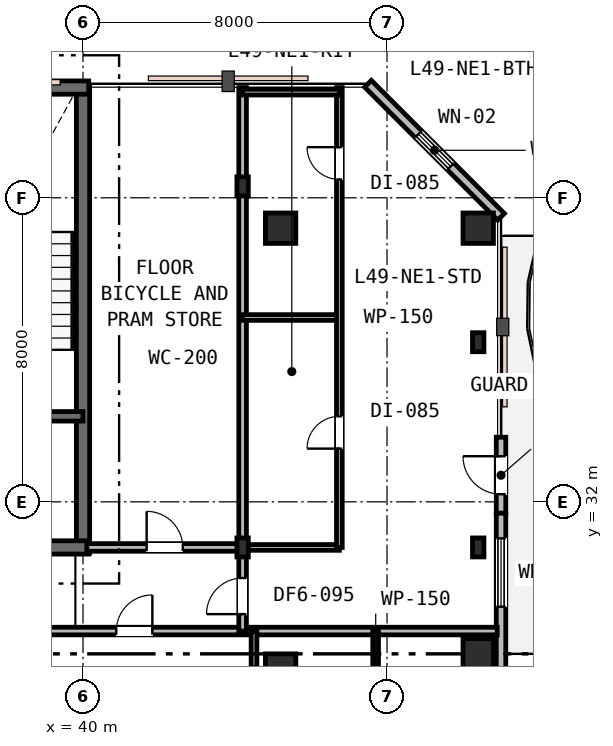
"""IFC4 building model, lengths in metres.
Left out: names, types, materials, properties, quantities, classifications, styles, units other than length and angle.
Written with IfcOpenShell. Run it as: python <this file> out.ifc"""

import sys

from ifc_helpers import new_model, si_unit, direction, frame, frame_2d, origin, origin_2d, place, context, subcontext, project, spatial, rectangle, i_section, extrude, element, fill, save


model = new_model("IFC4")
c1 = context("Model", 3, precision=1e-05, world=origin(), true_north=direction((0.0, 1.0)))
c2 = subcontext(c1, "Body", "Model", "MODEL_VIEW")
j1 = project(units=[si_unit("LENGTHUNIT", "METRE"), si_unit("PLANEANGLEUNIT", "RADIAN")], contexts=[c1])
p1 = place(None, origin())
s1 = spatial("IfcSite", under=j1, at=p1, CompositionType="ELEMENT")
p2 = place(p1, origin())
s2 = spatial("IfcBuilding", under=s1, at=p2, CompositionType="ELEMENT")
p3 = place(p2, frame((0.0, 0.0, 190.2)))
s3 = spatial("IfcBuildingStorey", under=s2, at=p3, CompositionType="ELEMENT", Elevation=190.2)
p4 = place(p3, frame((40.0, 30.65, 0.0), z_axis=(0.0, 0.0, 1.0), x_axis=(0.0, 1.0, 0.0)))
e1 = element("IfcWall", 1, at=p4, inside=s3, PredefinedType="SHEAR", context=c2, shape_type="SweptSolid", body=[
    extrude(rectangle(XDim=12.3, YDim=0.35, at=frame_2d((6.15, 0.0))), origin(), (0.0, 0.0, 1.0), 3.6),
])
p5 = place(p3, frame((15.85, 42.9, 0.0), z_axis=(0.0, 0.0, 1.0), x_axis=(1.0, 0.0, 0.0)))
e2 = element("IfcWall", 2, at=p5, inside=s3, PredefinedType="SHEAR", context=c2, shape_type="SweptSolid", body=[
    extrude(rectangle(XDim=24.3, YDim=0.35, at=frame_2d((12.15, 0.0))), origin(), (0.0, 0.0, 1.0), 3.6),
])
p6 = place(p5, frame((1.6, 0.0, 0.95)))
e3 = element("IfcOpeningElement", 3, at=p6, cuts=e2, PredefinedType="OPENING", context=c2, shape_type="SweptSolid", body=[
    extrude(rectangle(XDim=1.2, YDim=1.6, at=frame_2d((0.6, 0.8))), frame((0.0, 0.185, 0.0), z_axis=(0.0, -1.0, 0.0), x_axis=(1.0, 0.0, 0.0)), (0.0, 0.0, 1.0), 0.37),
])
p7 = place(p5, frame((16.5, 0.0, 0.95)))
e4 = element("IfcOpeningElement", 4, at=p7, cuts=e2, PredefinedType="OPENING", context=c2, shape_type="SweptSolid", body=[
    extrude(rectangle(XDim=1.2, YDim=1.6, at=frame_2d((0.6, 0.8))), frame((0.0, 0.185, 0.0), z_axis=(0.0, -1.0, 0.0), x_axis=(1.0, 0.0, 0.0)), (0.0, 0.0, 1.0), 0.37),
])
p8 = place(p5, frame((21.6, 0.0, 0.95)))
e5 = element("IfcOpeningElement", 5, at=p8, cuts=e2, PredefinedType="OPENING", context=c2, shape_type="SweptSolid", body=[
    extrude(rectangle(XDim=1.2, YDim=1.6, at=frame_2d((0.6, 0.8))), frame((0.0, 0.185, 0.0), z_axis=(0.0, -1.0, 0.0), x_axis=(1.0, 0.0, 0.0)), (0.0, 0.0, 1.0), 0.37),
])
p9 = place(p3, frame((28.95, 30.8, 0.0), z_axis=(0.0, 0.0, 1.0), x_axis=(1.0, 0.0, 0.0)))
e6 = element("IfcWall", 6, at=p9, inside=s3, PredefinedType="SHEAR", context=c2, shape_type="SweptSolid", body=[
    extrude(rectangle(XDim=11.2, YDim=0.35, at=frame_2d((5.6, 0.0))), origin(), (0.0, 0.0, 1.0), 3.6),
])
p10 = place(p9, frame((7.65, 0.0, 0.0)))
e7 = element("IfcOpeningElement", 7, at=p10, cuts=e6, PredefinedType="OPENING", context=c2, shape_type="SweptSolid", body=[
    extrude(rectangle(XDim=1.1, YDim=2.15, at=frame_2d((0.55, 1.075))), frame((0.0, 0.185, 0.0), z_axis=(0.0, -1.0, 0.0), x_axis=(1.0, 0.0, 0.0)), (0.0, 0.0, 1.0), 0.37),
])
p11 = place(p3, frame((33.95, 34.25, 0.0), z_axis=(0.0, 0.0, 1.0), x_axis=(1.0, 0.0, 0.0)))
e8 = element("IfcWall", 8, at=p11, inside=s3, PredefinedType="SHEAR", context=c2, shape_type="SweptSolid", body=[
    extrude(rectangle(XDim=6.05, YDim=0.25, at=frame_2d((3.025, 0.0))), origin(), (0.0, 0.0, 1.0), 3.6),
])
p12 = place(p11, frame((3.7, 0.0, 0.0)))
e9 = element("IfcOpeningElement", 9, at=p12, cuts=e8, PredefinedType="OPENING", context=c2, shape_type="SweptSolid", body=[
    extrude(rectangle(XDim=1.0, YDim=2.15, at=frame_2d((0.5, 1.075))), frame((0.0, 0.135, 0.0), z_axis=(0.0, -1.0, 0.0), x_axis=(1.0, 0.0, 0.0)), (0.0, 0.0, 1.0), 0.27),
])
p13 = place(p11, frame((0.55, 0.0, 0.0)))
e10 = element("IfcOpeningElement", 10, at=p13, cuts=e8, PredefinedType="OPENING", context=c2, shape_type="SweptSolid", body=[
    extrude(rectangle(XDim=1.1, YDim=2.15, at=frame_2d((0.55, 1.075))), frame((0.0, 0.135, 0.0), z_axis=(0.0, -1.0, 0.0), x_axis=(1.0, 0.0, 0.0)), (0.0, 0.0, 1.0), 0.27),
])
for number, where, z_axis, x_axis in (
    (11, (45.2, 27.6, 0.0), (0.0, 0.0, 1.0), (1.0, 0.0, 0.0)),
    (12, (45.2, 39.2, 0.0), (0.0, 0.0, 1.0), (1.0, 0.0, 0.0)),
    (13, (50.4, 28.0, 0.0), (0.0, 0.0, 1.0), (1.0, 0.0, 0.0)),
    (14, (50.4, 39.2, 0.0), (0.0, 0.0, 1.0), (1.0, 0.0, 0.0)),
):
    element("IfcColumn", number, at=place(p3, frame(where, z_axis=z_axis, x_axis=x_axis)), inside=s3, PredefinedType="COLUMN", context=c2, shape_type="SweptSolid", body=[
        extrude(rectangle(XDim=0.8, YDim=0.8, at=origin_2d()), origin(), (0.0, 0.0, 1.0), 3.6),
    ])
for number, where, z_axis, x_axis in (
    (15, (44.2, 30.8, 0.0), (0.0, 0.0, 1.0), (1.0, 0.0, 0.0)),
    (16, (44.2, 40.3, 0.0), (0.0, 0.0, 1.0), (1.0, 0.0, 0.0)),
    (17, (50.4, 30.8, 0.0), (0.0, 0.0, 1.0), (1.0, 0.0, 0.0)),
    (18, (50.4, 36.2, 0.0), (0.0, 0.0, 1.0), (1.0, 0.0, 0.0)),
):
    element("IfcColumn", number, at=place(p3, frame(where, z_axis=z_axis, x_axis=x_axis)), inside=s3, PredefinedType="COLUMN", context=c2, shape_type="SweptSolid", body=[
        extrude(i_section(OverallWidth=0.3, OverallDepth=0.5, WebThickness=0.015, FlangeThickness=0.028, FilletRadius=0.027, at=origin_2d()), origin(), (0.0, 0.0, 1.0), 3.6),
    ])
p14 = place(p3, frame((51.0, 31.7, 0.0), z_axis=(0.0, 0.0, 1.0), x_axis=(0.0, 1.0, 0.0)))
e19 = element("IfcWall", 19, at=p14, inside=s3, PredefinedType="STANDARD", context=c2, shape_type="SweptSolid", body=[
    extrude(rectangle(XDim=2.0, YDim=0.25, at=frame_2d((1.0, 0.0))), origin(), (0.0, 0.0, 1.0), 3.33),
])
p15 = place(p14, frame((0.5, 0.0, 0.0)))
e20 = element("IfcOpeningElement", 20, at=p15, cuts=e19, PredefinedType="OPENING", context=c2, shape_type="SweptSolid", body=[
    extrude(rectangle(XDim=1.0, YDim=2.15, at=frame_2d((0.5, 1.075))), frame((0.0, 0.135, 0.0), z_axis=(0.0, -1.0, 0.0), x_axis=(1.0, 0.0, 0.0)), (0.0, 0.0, 1.0), 0.27),
])
p16 = place(p3, frame((51.0, 27.5, 0.0), z_axis=(0.0, 0.0, 1.0), x_axis=(0.0, 1.0, 0.0)))
e21 = element("IfcWall", 21, at=p16, inside=s3, PredefinedType="STANDARD", context=c2, shape_type="SweptSolid", body=[
    extrude(rectangle(XDim=4.2, YDim=0.25, at=frame_2d((2.1, 0.0))), origin(), (0.0, 0.0, 1.0), 3.33),
])
p17 = place(p16, frame((1.74, 0.0, 0.75)))
e22 = element("IfcOpeningElement", 22, at=p17, cuts=e21, PredefinedType="OPENING", context=c2, shape_type="SweptSolid", body=[
    extrude(rectangle(XDim=1.8, YDim=1.85, at=frame_2d((0.9, 0.925))), frame((0.0, 0.135, 0.0), z_axis=(0.0, -1.0, 0.0), x_axis=(1.0, 0.0, 0.0)), (0.0, 0.0, 1.0), 0.27),
])
p18 = place(p3, frame((51.0, 39.5, 0.0), z_axis=(0.0, 0.0, 1.0), x_axis=(-0.707106781187, 0.707106781187, 0.0)))
e23 = element("IfcWall", 23, at=p18, inside=s3, PredefinedType="STANDARD", context=c2, shape_type="SweptSolid", body=[
    extrude(rectangle(XDim=4.95, YDim=0.25, at=frame_2d((2.475, 0.0))), origin(), (0.0, 0.0, 1.0), 3.33),
])
p19 = place(p18, frame((1.875, 0.0, 0.85)))
e24 = element("IfcOpeningElement", 24, at=p19, cuts=e23, PredefinedType="OPENING", context=c2, shape_type="SweptSolid", body=[
    extrude(rectangle(XDim=1.2, YDim=1.6, at=frame_2d((0.6, 0.8))), frame((0.0, 0.135, 0.0), z_axis=(0.0, -1.0, 0.0), x_axis=(1.0, 0.0, 0.0)), (0.0, 0.0, 1.0), 0.27),
])
p20 = place(p3, frame((11.6, 28.6, 0.0), z_axis=(0.0, 0.0, 1.0), x_axis=(1.0, 0.0, 0.0)))
e25 = element("IfcWall", 25, at=p20, inside=s3, PredefinedType="PARTITIONING", context=c2, shape_type="SweptSolid", body=[
    extrude(rectangle(XDim=39.3, YDim=0.2, at=frame_2d((19.65, 0.0))), origin(), (0.0, 0.0, 1.0), 2.92),
])
p21 = place(p20, frame((15.825, 0.0, 0.0)))
e26 = element("IfcOpeningElement", 26, at=p21, cuts=e25, PredefinedType="OPENING", context=c2, shape_type="SweptSolid", body=[
    extrude(rectangle(XDim=0.95, YDim=2.15, at=frame_2d((0.475, 1.075))), frame((0.0, 0.11, 0.0), z_axis=(0.0, -1.0, 0.0), x_axis=(1.0, 0.0, 0.0)), (0.0, 0.0, 1.0), 0.22),
])
p22 = place(p20, frame((29.275, 0.0, 0.0)))
e27 = element("IfcOpeningElement", 27, at=p22, cuts=e25, PredefinedType="OPENING", context=c2, shape_type="SweptSolid", body=[
    extrude(rectangle(XDim=0.95, YDim=2.15, at=frame_2d((0.475, 1.075))), frame((0.0, 0.11, 0.0), z_axis=(0.0, -1.0, 0.0), x_axis=(1.0, 0.0, 0.0)), (0.0, 0.0, 1.0), 0.22),
])
p23 = place(p3, frame((40.1, 30.8, 0.0), z_axis=(0.0, 0.0, 1.0), x_axis=(1.0, 0.0, 0.0)))
e28 = element("IfcWall", 28, at=p23, inside=s3, PredefinedType="PARTITIONING", context=c2, shape_type="SweptSolid", body=[
    extrude(rectangle(XDim=4.1, YDim=0.2, at=frame_2d((2.05, 0.0))), origin(), (0.0, 0.0, 1.0), 2.92),
])
p24 = place(p23, frame((1.575, 0.0, 0.0)))
e29 = element("IfcOpeningElement", 29, at=p24, cuts=e28, PredefinedType="OPENING", context=c2, shape_type="SweptSolid", body=[
    extrude(rectangle(XDim=0.95, YDim=2.15, at=frame_2d((0.475, 1.075))), frame((0.0, 0.11, 0.0), z_axis=(0.0, -1.0, 0.0), x_axis=(1.0, 0.0, 0.0)), (0.0, 0.0, 1.0), 0.22),
])
p25 = place(p3, frame((44.2, 28.6, 0.0), z_axis=(0.0, 0.0, 1.0), x_axis=(0.0, 1.0, 0.0)))
e30 = element("IfcWall", 30, at=p25, inside=s3, PredefinedType="PARTITIONING", context=c2, shape_type="SweptSolid", body=[
    extrude(rectangle(XDim=14.3, YDim=0.2, at=frame_2d((7.15, 0.0))), origin(), (0.0, 0.0, 1.0), 2.92),
])
p26 = place(p25, frame((0.445, 0.0, 0.0)))
e31 = element("IfcOpeningElement", 31, at=p26, cuts=e30, PredefinedType="OPENING", context=c2, shape_type="SweptSolid", body=[
    extrude(rectangle(XDim=0.95, YDim=2.15, at=frame_2d((0.475, 1.075))), frame((0.0, 0.11, 0.0), z_axis=(0.0, -1.0, 0.0), x_axis=(1.0, 0.0, 0.0)), (0.0, 0.0, 1.0), 0.22),
])
for number, where, z_axis, x_axis in (
    (32, (44.2, 30.8, 0.0), (0.0, 0.0, 1.0), (1.0, 0.0, 0.0)),
    (33, (44.2, 36.85, 0.0), (0.0, 0.0, 1.0), (1.0, 0.0, 0.0)),
):
    element("IfcWall", number, at=place(p3, frame(where, z_axis=z_axis, x_axis=x_axis)), inside=s3, PredefinedType="PARTITIONING", context=c2, shape_type="SweptSolid", body=[
        extrude(rectangle(XDim=2.546, YDim=0.15, at=frame_2d((1.273, 0.0))), origin(), (0.0, 0.0, 1.0), 2.92),
    ])
p27 = place(p3, frame((46.746, 30.8, 0.0), z_axis=(0.0, 0.0, 1.0), x_axis=(0.0, 1.0, 0.0)))
e34 = element("IfcWall", 34, at=p27, inside=s3, PredefinedType="PARTITIONING", context=c2, shape_type="SweptSolid", body=[
    extrude(rectangle(XDim=12.1, YDim=0.15, at=frame_2d((6.05, 0.0))), origin(), (0.0, 0.0, 1.0), 2.92),
])
p28 = place(p27, frame((2.6, 0.0, 0.0)))
e35 = element("IfcOpeningElement", 35, at=p28, cuts=e34, PredefinedType="OPENING", context=c2, shape_type="SweptSolid", body=[
    extrude(rectangle(XDim=0.85, YDim=2.15, at=frame_2d((0.425, 1.075))), frame((0.0, 0.085, 0.0), z_axis=(0.0, -1.0, 0.0), x_axis=(1.0, 0.0, 0.0)), (0.0, 0.0, 1.0), 0.17),
])
p29 = place(p27, frame((9.682, 0.0, 0.0)))
e36 = element("IfcOpeningElement", 36, at=p29, cuts=e34, PredefinedType="OPENING", context=c2, shape_type="SweptSolid", body=[
    extrude(rectangle(XDim=0.85, YDim=2.15, at=frame_2d((0.425, 1.075))), frame((0.0, 0.085, 0.0), z_axis=(0.0, -1.0, 0.0), x_axis=(1.0, 0.0, 0.0)), (0.0, 0.0, 1.0), 0.17),
])
p30 = place(p3, frame((44.2, 42.78, 0.0), z_axis=(0.0, 0.0, 1.0), x_axis=(1.0, 0.0, 0.0)))
e37 = element("IfcWall", 37, at=p30, inside=s3, PredefinedType="PARTITIONING", context=c2, shape_type="SweptSolid", body=[
    extrude(rectangle(XDim=2.546, YDim=0.15, at=frame_2d((1.273, 0.0))), origin(), (0.0, 0.0, 1.0), 3.33),
])
for number, where, z_axis, x_axis in (
    (38, (44.5, 26.576, 0.0), (0.0, 0.0, 1.0), (0.0, 1.0, 0.0)),
    (39, (47.7, 26.576, 0.0), (0.0, 0.0, 1.0), (0.0, 1.0, 0.0)),
):
    element("IfcWall", number, at=place(p3, frame(where, z_axis=z_axis, x_axis=x_axis)), inside=s3, PredefinedType="PARTITIONING", context=c2, shape_type="SweptSolid", body=[
        extrude(rectangle(XDim=2.024, YDim=0.15, at=frame_2d((1.012, 0.0))), origin(), (0.0, 0.0, 1.0), 3.33),
    ])
p31 = place(p15, origin())
e40 = element("IfcDoor", 40, at=p31, inside=s3, OperationType="SINGLE_SWING_RIGHT", PredefinedType="DOOR", context=c2, shape_type="SweptSolid", body=[
    extrude(rectangle(XDim=1.0, YDim=2.15, at=frame_2d((0.5, 1.075))), frame((0.0, 0.025, 0.0), z_axis=(0.0, -1.0, 0.0), x_axis=(1.0, 0.0, 0.0)), (0.0, 0.0, 1.0), 0.05),
])
fill(e20, e40)
p32 = place(p17, origin())
e41 = element("IfcWindow", 41, at=p32, inside=s3, PartitioningType="SINGLE_PANEL", PredefinedType="WINDOW", context=c2, shape_type="SweptSolid", body=[
    extrude(rectangle(XDim=1.8, YDim=1.85, at=frame_2d((0.9, 0.925))), frame((0.0, 0.03, 0.0), z_axis=(0.0, -1.0, 0.0), x_axis=(1.0, 0.0, 0.0)), (0.0, 0.0, 1.0), 0.06),
])
fill(e22, e41)
p33 = place(p19, origin())
e42 = element("IfcWindow", 42, at=p33, inside=s3, PartitioningType="SINGLE_PANEL", PredefinedType="WINDOW", context=c2, shape_type="SweptSolid", body=[
    extrude(rectangle(XDim=1.2, YDim=1.6, at=frame_2d((0.6, 0.8))), frame((0.0, 0.03, 0.0), z_axis=(0.0, -1.0, 0.0), x_axis=(1.0, 0.0, 0.0)), (0.0, 0.0, 1.0), 0.06),
])
fill(e24, e42)
p34 = place(p24, origin())
e43 = element("IfcDoor", 43, at=p34, inside=s3, OperationType="SINGLE_SWING_LEFT", PredefinedType="DOOR", context=c2, shape_type="SweptSolid", body=[
    extrude(rectangle(XDim=0.95, YDim=2.15, at=frame_2d((0.475, 1.075))), frame((0.0, 0.025, 0.0), z_axis=(0.0, -1.0, 0.0), x_axis=(1.0, 0.0, 0.0)), (0.0, 0.0, 1.0), 0.05),
])
fill(e29, e43)
p35 = place(p26, origin())
e44 = element("IfcDoor", 44, at=p35, inside=s3, OperationType="SINGLE_SWING_LEFT", PredefinedType="DOOR", context=c2, shape_type="SweptSolid", body=[
    extrude(rectangle(XDim=0.95, YDim=2.15, at=frame_2d((0.475, 1.075))), frame((0.0, 0.025, 0.0), z_axis=(0.0, -1.0, 0.0), x_axis=(1.0, 0.0, 0.0)), (0.0, 0.0, 1.0), 0.05),
])
fill(e31, e44)
p36 = place(p28, origin())
e45 = element("IfcDoor", 45, at=p36, inside=s3, OperationType="SINGLE_SWING_LEFT", PredefinedType="DOOR", context=c2, shape_type="SweptSolid", body=[
    extrude(rectangle(XDim=0.85, YDim=2.15, at=frame_2d((0.425, 1.075))), frame((0.0, 0.025, 0.0), z_axis=(0.0, -1.0, 0.0), x_axis=(1.0, 0.0, 0.0)), (0.0, 0.0, 1.0), 0.05),
])
fill(e35, e45)
p37 = place(p29, origin())
e46 = element("IfcDoor", 46, at=p37, inside=s3, OperationType="SINGLE_SWING_RIGHT", PredefinedType="DOOR", context=c2, shape_type="SweptSolid", body=[
    extrude(rectangle(XDim=0.85, YDim=2.15, at=frame_2d((0.425, 1.075))), frame((0.0, 0.025, 0.0), z_axis=(0.0, -1.0, 0.0), x_axis=(1.0, 0.0, 0.0)), (0.0, 0.0, 1.0), 0.05),
])
fill(e36, e46)
p38 = place(p22, origin())
e47 = element("IfcDoor", 47, at=p38, inside=s3, OperationType="SINGLE_SWING_RIGHT", PredefinedType="DOOR", context=c2, shape_type="SweptSolid", body=[
    extrude(rectangle(XDim=0.95, YDim=2.15, at=frame_2d((0.475, 1.075))), frame((0.0, 0.025, 0.0), z_axis=(0.0, -1.0, 0.0), x_axis=(1.0, 0.0, 0.0)), (0.0, 0.0, 1.0), 0.05),
])
fill(e27, e47)
save(model, sys.argv[1])
